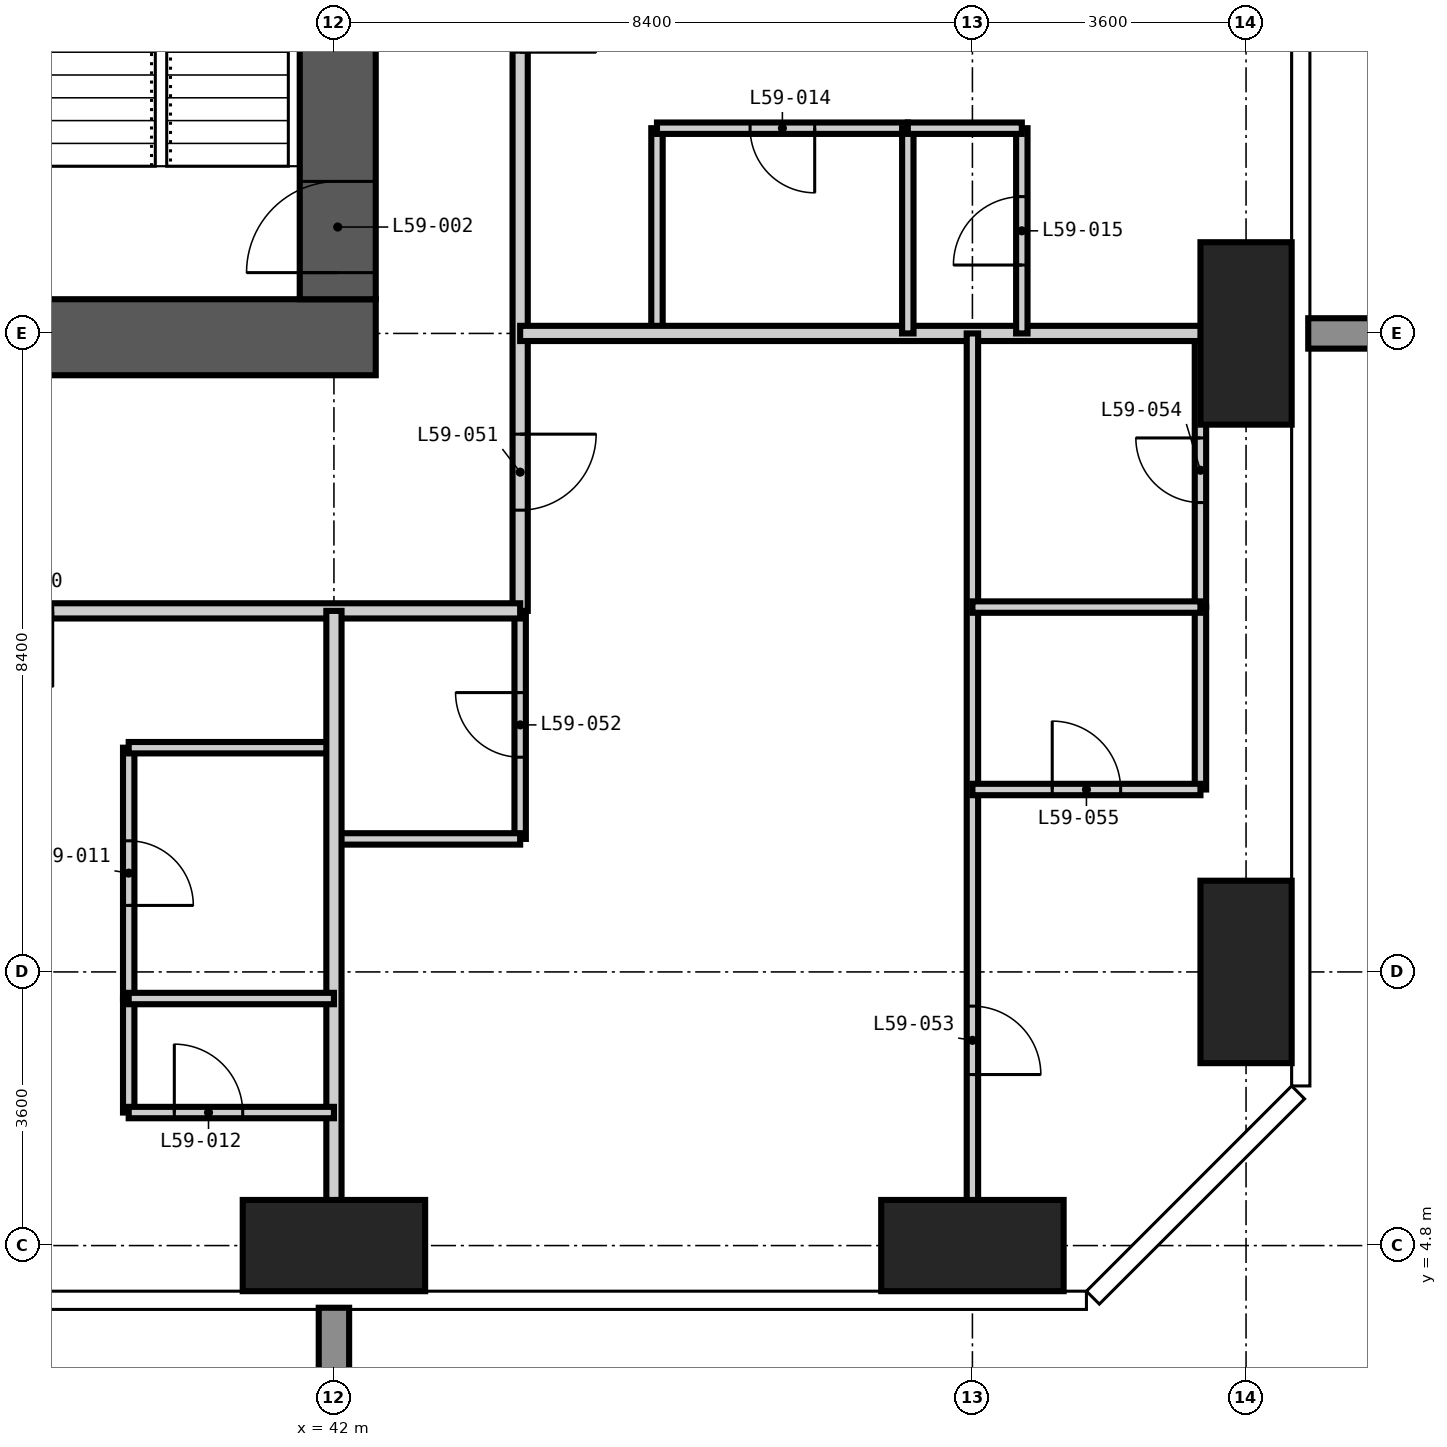
"""IFC4 building model, lengths in metres.
Left out: names, types, materials, properties, quantities, classifications, styles, units other than length and angle.
Written with IfcOpenShell. Run it as: python <this file> out.ifc"""

import sys

from ifc_helpers import new_model, si_unit, direction, frame, frame_2d, origin, origin_2d, place, context, subcontext, project, spatial, rectangle, extrude, element, fill, save


model = new_model("IFC4")
c1 = context("Model", 3, precision=1e-05, world=origin(), true_north=direction((0.0, 1.0)))
c2 = subcontext(c1, "Body", "Model", "MODEL_VIEW")
j1 = project(units=[si_unit("LENGTHUNIT", "METRE"), si_unit("PLANEANGLEUNIT", "RADIAN")], contexts=[c1])
p1 = place(None, origin())
s1 = spatial("IfcSite", under=j1, at=p1, CompositionType="ELEMENT")
p2 = place(p1, origin())
s2 = spatial("IfcBuilding", under=s1, at=p2, CompositionType="ELEMENT")
p3 = place(p2, frame((0.0, 0.0, 229.5)))
s3 = spatial("IfcBuildingStorey", under=s2, at=p3, CompositionType="ELEMENT", Elevation=229.5)
for number, where, z_axis, x_axis in (
    (1, (42.0, 4.8, -0.35), (0.0, 0.0, 1.0), (1.0, 0.0, 0.0)),
    (2, (50.4, 4.8, -0.35), (0.0, 0.0, 1.0), (1.0, 0.0, 0.0)),
):
    element("IfcColumn", number, at=place(p3, frame(where, z_axis=z_axis, x_axis=x_axis)), inside=s3, PredefinedType="COLUMN", context=c2, shape_type="SweptSolid", body=[
        extrude(rectangle(XDim=2.4, YDim=1.2, at=origin_2d()), origin(), (0.0, 0.0, 1.0), 3.9),
    ])
for number, where, z_axis, x_axis in (
    (3, (54.0, 8.4, -0.35), (0.0, 0.0, 1.0), (1.0, 0.0, 0.0)),
    (4, (54.0, 16.8, -0.35), (0.0, 0.0, 1.0), (1.0, 0.0, 0.0)),
):
    element("IfcColumn", number, at=place(p3, frame(where, z_axis=z_axis, x_axis=x_axis)), inside=s3, PredefinedType="COLUMN", context=c2, shape_type="SweptSolid", body=[
        extrude(rectangle(XDim=1.2, YDim=2.4, at=origin_2d()), origin(), (0.0, 0.0, 1.0), 3.9),
    ])
p4 = place(p3, frame((24.425, 16.75, -0.35), z_axis=(0.0, 0.0, 1.0), x_axis=(1.0, 0.0, 0.0)))
e5 = element("IfcWall", 5, at=p4, inside=s3, PredefinedType="SHEAR", context=c2, shape_type="SweptSolid", body=[
    extrude(rectangle(XDim=18.125, YDim=1.0, at=frame_2d((9.062, 0.0))), origin(), (0.0, 0.0, 1.0), 3.9),
])
p5 = place(p4, frame((4.475, 0.0, 0.35)))
e6 = element("IfcOpeningElement", 6, at=p5, cuts=e5, PredefinedType="OPENING", context=c2, shape_type="SweptSolid", body=[
    extrude(rectangle(XDim=1.0, YDim=2.1, at=frame_2d((0.5, 1.05))), frame((0.0, 0.51, 0.0), z_axis=(0.0, -1.0, 0.0), x_axis=(1.0, 0.0, 0.0)), (0.0, 0.0, 1.0), 1.02),
])
p6 = place(p4, frame((10.775, 0.0, 0.35)))
e7 = element("IfcOpeningElement", 7, at=p6, cuts=e5, PredefinedType="OPENING", context=c2, shape_type="SweptSolid", body=[
    extrude(rectangle(XDim=1.0, YDim=2.1, at=frame_2d((0.5, 1.05))), frame((0.0, 0.51, 0.0), z_axis=(0.0, -1.0, 0.0), x_axis=(1.0, 0.0, 0.0)), (0.0, 0.0, 1.0), 1.02),
])
p7 = place(p3, frame((42.05, 17.25, -0.35), z_axis=(0.0, 0.0, 1.0), x_axis=(0.0, 1.0, 0.0)))
e8 = element("IfcWall", 8, at=p7, inside=s3, PredefinedType="SHEAR", context=c2, shape_type="SweptSolid", body=[
    extrude(rectangle(XDim=24.3, YDim=1.0, at=frame_2d((12.15, 0.0))), origin(), (0.0, 0.0, 1.0), 3.9),
])
p8 = place(p7, frame((0.35, 0.0, 0.35)))
e9 = element("IfcOpeningElement", 9, at=p8, cuts=e8, PredefinedType="OPENING", context=c2, shape_type="SweptSolid", body=[
    extrude(rectangle(XDim=1.2, YDim=2.2, at=frame_2d((0.6, 1.1))), frame((0.0, 0.51, 0.0), z_axis=(0.0, -1.0, 0.0), x_axis=(1.0, 0.0, 0.0)), (0.0, 0.0, 1.0), 1.02),
])
p9 = place(p7, frame((11.25, 0.0, 0.35)))
e10 = element("IfcOpeningElement", 10, at=p9, cuts=e8, PredefinedType="OPENING", context=c2, shape_type="SweptSolid", body=[
    extrude(rectangle(XDim=1.8, YDim=2.2, at=frame_2d((0.9, 1.1))), frame((0.0, 0.51, 0.0), z_axis=(0.0, -1.0, 0.0), x_axis=(1.0, 0.0, 0.0)), (0.0, 0.0, 1.0), 1.02),
])
p10 = place(p7, frame((20.05, 0.0, 0.35)))
e11 = element("IfcOpeningElement", 11, at=p10, cuts=e8, PredefinedType="OPENING", context=c2, shape_type="SweptSolid", body=[
    extrude(rectangle(XDim=1.0, YDim=2.1, at=frame_2d((0.5, 1.05))), frame((0.0, 0.51, 0.0), z_axis=(0.0, -1.0, 0.0), x_axis=(1.0, 0.0, 0.0)), (0.0, 0.0, 1.0), 1.02),
])
p11 = place(p3, frame((39.3, 8.05, 0.0), z_axis=(0.0, 0.0, 1.0), x_axis=(0.0, 1.0, 0.0)))
e12 = element("IfcWall", 12, at=p11, inside=s3, PredefinedType="PARTITIONING", context=c2, shape_type="SweptSolid", body=[
    extrude(rectangle(XDim=3.3, YDim=0.15, at=frame_2d((1.65, 0.0))), origin(), (0.0, 0.0, 1.0), 3.55),
])
p12 = place(p11, frame((1.225, 0.0, 0.0)))
e13 = element("IfcOpeningElement", 13, at=p12, cuts=e12, PredefinedType="OPENING", context=c2, shape_type="SweptSolid", body=[
    extrude(rectangle(XDim=0.85, YDim=2.1, at=frame_2d((0.425, 1.05))), frame((0.0, 0.085, 0.0), z_axis=(0.0, -1.0, 0.0), x_axis=(1.0, 0.0, 0.0)), (0.0, 0.0, 1.0), 0.17),
])
p13 = place(p3, frame((44.45, 10.15, 0.0), z_axis=(0.0, 0.0, 1.0), x_axis=(0.0, 1.0, 0.0)))
e14 = element("IfcWall", 14, at=p13, inside=s3, PredefinedType="PARTITIONING", context=c2, shape_type="SweptSolid", body=[
    extrude(rectangle(XDim=3.0, YDim=0.15, at=frame_2d((1.5, 0.0))), origin(), (0.0, 0.0, 1.0), 3.55),
])
p14 = place(p13, frame((1.075, 0.0, 0.0)))
e15 = element("IfcOpeningElement", 15, at=p14, cuts=e14, PredefinedType="OPENING", context=c2, shape_type="SweptSolid", body=[
    extrude(rectangle(XDim=0.85, YDim=2.1, at=frame_2d((0.425, 1.05))), frame((0.0, 0.085, 0.0), z_axis=(0.0, -1.0, 0.0), x_axis=(1.0, 0.0, 0.0)), (0.0, 0.0, 1.0), 0.17),
])
p15 = place(p3, frame((46.25, 16.8, 0.0), z_axis=(0.0, 0.0, 1.0), x_axis=(0.0, 1.0, 0.0)))
e16 = element("IfcWall", 16, at=p15, inside=s3, PredefinedType="PARTITIONING", context=c2, shape_type="SweptSolid", body=[
    extrude(rectangle(XDim=2.7, YDim=0.15, at=frame_2d((1.35, 0.0))), origin(), (0.0, 0.0, 1.0), 3.55),
])
p16 = place(p3, frame((53.4, 13.2, 0.0), z_axis=(0.0, 0.0, 1.0), x_axis=(0.0, 1.0, 0.0)))
e17 = element("IfcWall", 17, at=p16, inside=s3, PredefinedType="PARTITIONING", context=c2, shape_type="SweptSolid", body=[
    extrude(rectangle(XDim=3.6, YDim=0.15, at=frame_2d((1.8, 0.0))), origin(), (0.0, 0.0, 1.0), 3.55),
])
p17 = place(p16, frame((1.375, 0.0, 0.0)))
e18 = element("IfcOpeningElement", 18, at=p17, cuts=e17, PredefinedType="OPENING", context=c2, shape_type="SweptSolid", body=[
    extrude(rectangle(XDim=0.85, YDim=2.1, at=frame_2d((0.425, 1.05))), frame((0.0, 0.085, 0.0), z_axis=(0.0, -1.0, 0.0), x_axis=(1.0, 0.0, 0.0)), (0.0, 0.0, 1.0), 0.17),
])
p18 = place(p3, frame((42.0, 10.15, 0.0), z_axis=(0.0, 0.0, 1.0), x_axis=(1.0, 0.0, 0.0)))
e19 = element("IfcWall", 19, at=p18, inside=s3, PredefinedType="PARTITIONING", context=c2, shape_type="SweptSolid", body=[
    extrude(rectangle(XDim=2.45, YDim=0.15, at=frame_2d((1.225, 0.0))), origin(), (0.0, 0.0, 1.0), 3.55),
])
p19 = place(p3, frame((39.3, 11.35, 0.0), z_axis=(0.0, 0.0, 1.0), x_axis=(1.0, 0.0, 0.0)))
e20 = element("IfcWall", 20, at=p19, inside=s3, PredefinedType="PARTITIONING", context=c2, shape_type="SweptSolid", body=[
    extrude(rectangle(XDim=2.7, YDim=0.15, at=frame_2d((1.35, 0.0))), origin(), (0.0, 0.0, 1.0), 3.55),
])
p20 = place(p3, frame((46.25, 19.5, 0.0), z_axis=(0.0, 0.0, 1.0), x_axis=(1.0, 0.0, 0.0)))
e21 = element("IfcWall", 21, at=p20, inside=s3, PredefinedType="PARTITIONING", context=c2, shape_type="SweptSolid", body=[
    extrude(rectangle(XDim=3.3, YDim=0.15, at=frame_2d((1.65, 0.0))), origin(), (0.0, 0.0, 1.0), 3.55),
])
p21 = place(p20, frame((1.225, 0.0, 0.0)))
e22 = element("IfcOpeningElement", 22, at=p21, cuts=e21, PredefinedType="OPENING", context=c2, shape_type="SweptSolid", body=[
    extrude(rectangle(XDim=0.85, YDim=2.1, at=frame_2d((0.425, 1.05))), frame((0.0, 0.085, 0.0), z_axis=(0.0, -1.0, 0.0), x_axis=(1.0, 0.0, 0.0)), (0.0, 0.0, 1.0), 0.17),
])
p22 = place(p3, frame((44.45, 25.2, 0.0), z_axis=(0.0, 0.0, 1.0), x_axis=(0.0, -1.0, 0.0)))
e23 = element("IfcWall", 23, at=p22, inside=s3, PredefinedType="PARTITIONING", context=c2, shape_type="SweptSolid", body=[
    extrude(rectangle(XDim=12.05, YDim=0.2, at=frame_2d((6.025, 0.0))), origin(), (0.0, 0.0, 1.0), 3.55),
])
p23 = place(p22, frame((3.7, 0.0, 0.0)))
e24 = element("IfcOpeningElement", 24, at=p23, cuts=e23, PredefinedType="OPENING", context=c2, shape_type="SweptSolid", body=[
    extrude(rectangle(XDim=1.0, YDim=2.2, at=frame_2d((0.5, 1.1))), frame((0.0, 0.11, 0.0), z_axis=(0.0, -1.0, 0.0), x_axis=(1.0, 0.0, 0.0)), (0.0, 0.0, 1.0), 0.22),
])
p24 = place(p22, frame((9.725, 0.0, 0.0)))
e25 = element("IfcOpeningElement", 25, at=p24, cuts=e23, PredefinedType="OPENING", context=c2, shape_type="SweptSolid", body=[
    extrude(rectangle(XDim=1.0, YDim=2.2, at=frame_2d((0.5, 1.1))), frame((0.0, 0.11, 0.0), z_axis=(0.0, -1.0, 0.0), x_axis=(1.0, 0.0, 0.0)), (0.0, 0.0, 1.0), 0.22),
])
p25 = place(p3, frame((44.45, 13.15, 0.0), z_axis=(0.0, 0.0, 1.0), x_axis=(-1.0, 0.0, 0.0)))
e26 = element("IfcWall", 26, at=p25, inside=s3, PredefinedType="PARTITIONING", context=c2, shape_type="SweptSolid", body=[
    extrude(rectangle(XDim=23.125, YDim=0.2, at=frame_2d((11.562, 0.0))), origin(), (0.0, 0.0, 1.0), 3.55),
])
p26 = place(p25, frame((14.55, 0.0, 0.0)))
e27 = element("IfcOpeningElement", 27, at=p26, cuts=e26, PredefinedType="OPENING", context=c2, shape_type="SweptSolid", body=[
    extrude(rectangle(XDim=1.0, YDim=2.2, at=frame_2d((0.5, 1.1))), frame((0.0, 0.11, 0.0), z_axis=(0.0, -1.0, 0.0), x_axis=(1.0, 0.0, 0.0)), (0.0, 0.0, 1.0), 0.22),
])
p27 = place(p25, frame((6.15, 0.0, 0.0)))
e28 = element("IfcOpeningElement", 28, at=p27, cuts=e26, PredefinedType="OPENING", context=c2, shape_type="SweptSolid", body=[
    extrude(rectangle(XDim=1.0, YDim=2.2, at=frame_2d((0.5, 1.1))), frame((0.0, 0.11, 0.0), z_axis=(0.0, -1.0, 0.0), x_axis=(1.0, 0.0, 0.0)), (0.0, 0.0, 1.0), 0.22),
])
p28 = place(p3, frame((42.0, 4.182, 0.0), z_axis=(0.0, 0.0, 1.0), x_axis=(0.0, 1.0, 0.0)))
e29 = element("IfcWall", 29, at=p28, inside=s3, PredefinedType="PARTITIONING", context=c2, shape_type="SweptSolid", body=[
    extrude(rectangle(XDim=8.968, YDim=0.2, at=frame_2d((4.484, 0.0))), origin(), (0.0, 0.0, 1.0), 3.55),
])
p29 = place(p3, frame((44.45, 16.8, 0.0), z_axis=(0.0, 0.0, 1.0), x_axis=(1.0, 0.0, 0.0)))
e30 = element("IfcWall", 30, at=p29, inside=s3, PredefinedType="PARTITIONING", context=c2, shape_type="SweptSolid", body=[
    extrude(rectangle(XDim=10.168, YDim=0.2, at=frame_2d((5.084, 0.0))), origin(), (0.0, 0.0, 1.0), 3.55),
])
p30 = place(p3, frame((39.3, 6.55, 0.0), z_axis=(0.0, 0.0, 1.0), x_axis=(0.0, 1.0, 0.0)))
e31 = element("IfcWall", 31, at=p30, inside=s3, PredefinedType="PARTITIONING", context=c2, shape_type="SweptSolid", body=[
    extrude(rectangle(XDim=1.5, YDim=0.15, at=frame_2d((0.75, 0.0))), origin(), (0.0, 0.0, 1.0), 3.55),
])
p31 = place(p3, frame((49.55, 16.8, 0.0), z_axis=(0.0, 0.0, 1.0), x_axis=(0.0, 1.0, 0.0)))
e32 = element("IfcWall", 32, at=p31, inside=s3, PredefinedType="PARTITIONING", context=c2, shape_type="SweptSolid", body=[
    extrude(rectangle(XDim=2.7, YDim=0.15, at=frame_2d((1.35, 0.0))), origin(), (0.0, 0.0, 1.0), 3.55),
])
p32 = place(p3, frame((50.4, 4.182, 0.0), z_axis=(0.0, 0.0, 1.0), x_axis=(0.0, 1.0, 0.0)))
e33 = element("IfcWall", 33, at=p32, inside=s3, PredefinedType="PARTITIONING", context=c2, shape_type="SweptSolid", body=[
    extrude(rectangle(XDim=12.618, YDim=0.15, at=frame_2d((6.309, 0.0))), origin(), (0.0, 0.0, 1.0), 3.55),
])
p33 = place(p32, frame((2.868, 0.0, 0.0)))
e34 = element("IfcOpeningElement", 34, at=p33, cuts=e33, PredefinedType="OPENING", context=c2, shape_type="SweptSolid", body=[
    extrude(rectangle(XDim=0.9, YDim=2.1, at=frame_2d((0.45, 1.05))), frame((0.0, 0.085, 0.0), z_axis=(0.0, -1.0, 0.0), x_axis=(1.0, 0.0, 0.0)), (0.0, 0.0, 1.0), 0.17),
])
p34 = place(p3, frame((51.05, 16.8, 0.0), z_axis=(0.0, 0.0, 1.0), x_axis=(0.0, 1.0, 0.0)))
e35 = element("IfcWall", 35, at=p34, inside=s3, PredefinedType="PARTITIONING", context=c2, shape_type="SweptSolid", body=[
    extrude(rectangle(XDim=2.7, YDim=0.15, at=frame_2d((1.35, 0.0))), origin(), (0.0, 0.0, 1.0), 3.55),
])
p35 = place(p34, frame((0.9, 0.0, 0.0)))
e36 = element("IfcOpeningElement", 36, at=p35, cuts=e35, PredefinedType="OPENING", context=c2, shape_type="SweptSolid", body=[
    extrude(rectangle(XDim=0.9, YDim=2.1, at=frame_2d((0.45, 1.05))), frame((0.0, 0.085, 0.0), z_axis=(0.0, -1.0, 0.0), x_axis=(1.0, 0.0, 0.0)), (0.0, 0.0, 1.0), 0.17),
])
p36 = place(p3, frame((53.4, 10.8, 0.0), z_axis=(0.0, 0.0, 1.0), x_axis=(0.0, 1.0, 0.0)))
e37 = element("IfcWall", 37, at=p36, inside=s3, PredefinedType="PARTITIONING", context=c2, shape_type="SweptSolid", body=[
    extrude(rectangle(XDim=2.4, YDim=0.15, at=frame_2d((1.2, 0.0))), origin(), (0.0, 0.0, 1.0), 3.55),
])
p37 = place(p3, frame((39.3, 6.55, 0.0), z_axis=(0.0, 0.0, 1.0), x_axis=(1.0, 0.0, 0.0)))
e38 = element("IfcWall", 38, at=p37, inside=s3, PredefinedType="PARTITIONING", context=c2, shape_type="SweptSolid", body=[
    extrude(rectangle(XDim=2.7, YDim=0.15, at=frame_2d((1.35, 0.0))), origin(), (0.0, 0.0, 1.0), 3.55),
])
p38 = place(p37, frame((0.6, 0.0, 0.0)))
e39 = element("IfcOpeningElement", 39, at=p38, cuts=e38, PredefinedType="OPENING", context=c2, shape_type="SweptSolid", body=[
    extrude(rectangle(XDim=0.9, YDim=2.1, at=frame_2d((0.45, 1.05))), frame((0.0, 0.085, 0.0), z_axis=(0.0, -1.0, 0.0), x_axis=(1.0, 0.0, 0.0)), (0.0, 0.0, 1.0), 0.17),
])
p39 = place(p3, frame((39.3, 8.05, 0.0), z_axis=(0.0, 0.0, 1.0), x_axis=(1.0, 0.0, 0.0)))
e40 = element("IfcWall", 40, at=p39, inside=s3, PredefinedType="PARTITIONING", context=c2, shape_type="SweptSolid", body=[
    extrude(rectangle(XDim=2.7, YDim=0.15, at=frame_2d((1.35, 0.0))), origin(), (0.0, 0.0, 1.0), 3.55),
])
p40 = place(p3, frame((50.4, 10.8, 0.0), z_axis=(0.0, 0.0, 1.0), x_axis=(1.0, 0.0, 0.0)))
e41 = element("IfcWall", 41, at=p40, inside=s3, PredefinedType="PARTITIONING", context=c2, shape_type="SweptSolid", body=[
    extrude(rectangle(XDim=3.0, YDim=0.15, at=frame_2d((1.5, 0.0))), origin(), (0.0, 0.0, 1.0), 3.55),
])
p41 = place(p40, frame((1.05, 0.0, 0.0)))
e42 = element("IfcOpeningElement", 42, at=p41, cuts=e41, PredefinedType="OPENING", context=c2, shape_type="SweptSolid", body=[
    extrude(rectangle(XDim=0.9, YDim=2.1, at=frame_2d((0.45, 1.05))), frame((0.0, 0.085, 0.0), z_axis=(0.0, -1.0, 0.0), x_axis=(1.0, 0.0, 0.0)), (0.0, 0.0, 1.0), 0.17),
])
p42 = place(p3, frame((50.4, 13.2, 0.0), z_axis=(0.0, 0.0, 1.0), x_axis=(1.0, 0.0, 0.0)))
e43 = element("IfcWall", 43, at=p42, inside=s3, PredefinedType="PARTITIONING", context=c2, shape_type="SweptSolid", body=[
    extrude(rectangle(XDim=3.0, YDim=0.15, at=frame_2d((1.5, 0.0))), origin(), (0.0, 0.0, 1.0), 3.55),
])
p43 = place(p3, frame((49.55, 19.5, 0.0), z_axis=(0.0, 0.0, 1.0), x_axis=(1.0, 0.0, 0.0)))
e44 = element("IfcWall", 44, at=p43, inside=s3, PredefinedType="PARTITIONING", context=c2, shape_type="SweptSolid", body=[
    extrude(rectangle(XDim=1.5, YDim=0.15, at=frame_2d((0.75, 0.0))), origin(), (0.0, 0.0, 1.0), 3.55),
])
p44 = place(p8, origin())
e45 = element("IfcDoor", 45, at=p44, inside=s3, OperationType="SINGLE_SWING_LEFT", PredefinedType="DOOR", context=c2, shape_type="SweptSolid", body=[
    extrude(rectangle(XDim=1.2, YDim=2.2, at=frame_2d((0.6, 1.1))), frame((0.0, 0.025, 0.0), z_axis=(0.0, -1.0, 0.0), x_axis=(1.0, 0.0, 0.0)), (0.0, 0.0, 1.0), 0.05),
])
fill(e9, e45)
p45 = place(p12, frame((0.85, 0.0, 0.0), z_axis=(0.0, 0.0, 1.0), x_axis=(-1.0, 0.0, 0.0)))
e46 = element("IfcDoor", 46, at=p45, inside=s3, OperationType="SINGLE_SWING_RIGHT", PredefinedType="DOOR", context=c2, shape_type="SweptSolid", body=[
    extrude(rectangle(XDim=0.85, YDim=2.1, at=frame_2d((0.425, 1.05))), frame((0.0, 0.025, 0.0), z_axis=(0.0, -1.0, 0.0), x_axis=(1.0, 0.0, 0.0)), (0.0, 0.0, 1.0), 0.05),
])
fill(e13, e46)
p46 = place(p38, origin())
e47 = element("IfcDoor", 47, at=p46, inside=s3, OperationType="SINGLE_SWING_LEFT", PredefinedType="DOOR", context=c2, shape_type="SweptSolid", body=[
    extrude(rectangle(XDim=0.9, YDim=2.1, at=frame_2d((0.45, 1.05))), frame((0.0, 0.025, 0.0), z_axis=(0.0, -1.0, 0.0), x_axis=(1.0, 0.0, 0.0)), (0.0, 0.0, 1.0), 0.05),
])
fill(e39, e47)
p47 = place(p21, frame((0.85, 0.0, 0.0), z_axis=(0.0, 0.0, 1.0), x_axis=(-1.0, 0.0, 0.0)))
e48 = element("IfcDoor", 48, at=p47, inside=s3, OperationType="SINGLE_SWING_LEFT", PredefinedType="DOOR", context=c2, shape_type="SweptSolid", body=[
    extrude(rectangle(XDim=0.85, YDim=2.1, at=frame_2d((0.425, 1.05))), frame((0.0, 0.025, 0.0), z_axis=(0.0, -1.0, 0.0), x_axis=(1.0, 0.0, 0.0)), (0.0, 0.0, 1.0), 0.05),
])
fill(e22, e48)
p48 = place(p35, origin())
e49 = element("IfcDoor", 49, at=p48, inside=s3, OperationType="SINGLE_SWING_LEFT", PredefinedType="DOOR", context=c2, shape_type="SweptSolid", body=[
    extrude(rectangle(XDim=0.9, YDim=2.1, at=frame_2d((0.45, 1.05))), frame((0.0, 0.025, 0.0), z_axis=(0.0, -1.0, 0.0), x_axis=(1.0, 0.0, 0.0)), (0.0, 0.0, 1.0), 0.05),
])
fill(e36, e49)
p49 = place(p24, origin())
e50 = element("IfcDoor", 50, at=p49, inside=s3, OperationType="SINGLE_SWING_LEFT", PredefinedType="DOOR", context=c2, shape_type="SweptSolid", body=[
    extrude(rectangle(XDim=1.0, YDim=2.2, at=frame_2d((0.5, 1.1))), frame((0.0, 0.025, 0.0), z_axis=(0.0, -1.0, 0.0), x_axis=(1.0, 0.0, 0.0)), (0.0, 0.0, 1.0), 0.05),
])
fill(e25, e50)
p50 = place(p14, origin())
e51 = element("IfcDoor", 51, at=p50, inside=s3, OperationType="SINGLE_SWING_RIGHT", PredefinedType="DOOR", context=c2, shape_type="SweptSolid", body=[
    extrude(rectangle(XDim=0.85, YDim=2.1, at=frame_2d((0.425, 1.05))), frame((0.0, 0.025, 0.0), z_axis=(0.0, -1.0, 0.0), x_axis=(1.0, 0.0, 0.0)), (0.0, 0.0, 1.0), 0.05),
])
fill(e15, e51)
p51 = place(p33, frame((0.9, 0.0, 0.0), z_axis=(0.0, 0.0, 1.0), x_axis=(-1.0, 0.0, 0.0)))
e52 = element("IfcDoor", 52, at=p51, inside=s3, OperationType="SINGLE_SWING_RIGHT", PredefinedType="DOOR", context=c2, shape_type="SweptSolid", body=[
    extrude(rectangle(XDim=0.9, YDim=2.1, at=frame_2d((0.45, 1.05))), frame((0.0, 0.025, 0.0), z_axis=(0.0, -1.0, 0.0), x_axis=(1.0, 0.0, 0.0)), (0.0, 0.0, 1.0), 0.05),
])
fill(e34, e52)
p52 = place(p17, origin())
e53 = element("IfcDoor", 53, at=p52, inside=s3, OperationType="SINGLE_SWING_RIGHT", PredefinedType="DOOR", context=c2, shape_type="SweptSolid", body=[
    extrude(rectangle(XDim=0.85, YDim=2.1, at=frame_2d((0.425, 1.05))), frame((0.0, 0.025, 0.0), z_axis=(0.0, -1.0, 0.0), x_axis=(1.0, 0.0, 0.0)), (0.0, 0.0, 1.0), 0.05),
])
fill(e18, e53)
p53 = place(p41, origin())
e54 = element("IfcDoor", 54, at=p53, inside=s3, OperationType="SINGLE_SWING_LEFT", PredefinedType="DOOR", context=c2, shape_type="SweptSolid", body=[
    extrude(rectangle(XDim=0.9, YDim=2.1, at=frame_2d((0.45, 1.05))), frame((0.0, 0.025, 0.0), z_axis=(0.0, -1.0, 0.0), x_axis=(1.0, 0.0, 0.0)), (0.0, 0.0, 1.0), 0.05),
])
fill(e42, e54)
save(model, sys.argv[1])
